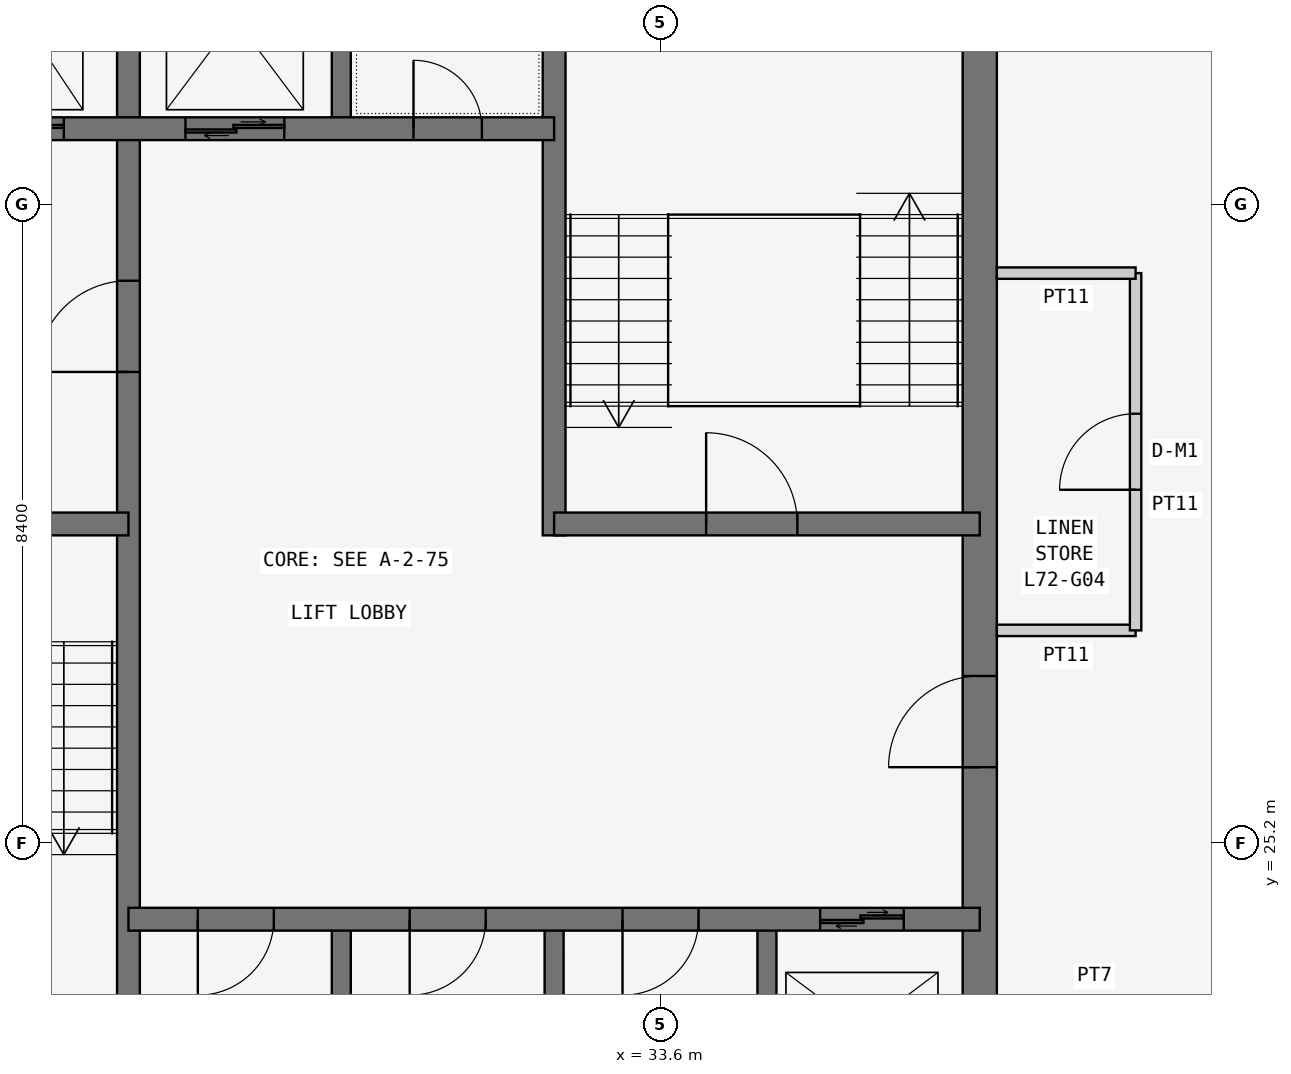
"""IFC4 building model, lengths in metres.
Left out: names, types, materials, properties, quantities, classifications, styles, units other than length and angle.
Written with IfcOpenShell. Run it as: python <this file> out.ifc"""

import sys

from ifc_helpers import new_model, si_unit, direction, frame, frame_2d, origin, place, context, subcontext, project, spatial, rectangle, extrude, element, fill, save


model = new_model("IFC4")
c1 = context("Model", 3, precision=1e-05, world=origin(), true_north=direction((0.0, 1.0)))
c2 = subcontext(c1, "Body", "Model", "MODEL_VIEW")
j1 = project(units=[si_unit("LENGTHUNIT", "METRE"), si_unit("PLANEANGLEUNIT", "RADIAN")], contexts=[c1])
p1 = place(None, origin())
s1 = spatial("IfcSite", under=j1, at=p1, CompositionType="ELEMENT")
p2 = place(p1, origin())
s2 = spatial("IfcBuilding", under=s1, at=p2, CompositionType="ELEMENT")
p3 = place(p2, frame((0.0, 0.0, 275.7)))
s3 = spatial("IfcBuildingStorey", under=s2, at=p3, CompositionType="ELEMENT", Elevation=275.7)
p4 = place(p3, frame((37.8, 21.0, 0.0), z_axis=(0.0, 0.0, 1.0), x_axis=(0.0, 1.0, 0.0)))
e1 = element("IfcWall", 1, at=p4, inside=s3, PredefinedType="SHEAR", context=c2, shape_type="SweptSolid", body=[
    extrude(rectangle(XDim=17.025, YDim=0.45, at=frame_2d((8.512, 0.0))), origin(), (0.0, 0.0, 1.0), 3.6),
])
p5 = place(p4, frame((5.2, 0.0, 0.0)))
e2 = element("IfcOpeningElement", 2, at=p5, cuts=e1, PredefinedType="OPENING", context=c2, shape_type="SweptSolid", body=[
    extrude(rectangle(XDim=1.2, YDim=2.1, at=frame_2d((0.6, 1.05))), frame((0.0, 0.235, 0.0), z_axis=(0.0, -1.0, 0.0), x_axis=(1.0, 0.0, 0.0)), (0.0, 0.0, 1.0), 0.47),
])
p6 = place(p3, frame((26.6, 21.0, 0.0), z_axis=(0.0, 0.0, 1.0), x_axis=(0.0, 1.0, 0.0)))
e3 = element("IfcWall", 3, at=p6, inside=s3, PredefinedType="SHEAR", context=c2, shape_type="SweptSolid", body=[
    extrude(rectangle(XDim=16.8, YDim=0.3, at=frame_2d((8.4, 0.0))), origin(), (0.0, 0.0, 1.0), 3.6),
])
p7 = place(p6, frame((10.4, 0.0, 0.0)))
e4 = element("IfcOpeningElement", 4, at=p7, cuts=e3, PredefinedType="OPENING", context=c2, shape_type="SweptSolid", body=[
    extrude(rectangle(XDim=1.2, YDim=2.1, at=frame_2d((0.6, 1.05))), frame((0.0, 0.16, 0.0), z_axis=(0.0, -1.0, 0.0), x_axis=(1.0, 0.0, 0.0)), (0.0, 0.0, 1.0), 0.32),
])
p8 = place(p3, frame((21.0, 29.4, 0.0), z_axis=(0.0, 0.0, 1.0), x_axis=(1.0, 0.0, 0.0)))
e5 = element("IfcWall", 5, at=p8, inside=s3, PredefinedType="SHEAR", context=c2, shape_type="SweptSolid", body=[
    extrude(rectangle(XDim=5.6, YDim=0.3, at=frame_2d((2.8, 0.0))), origin(), (0.0, 0.0, 1.0), 3.6),
])
p9 = place(p8, frame((2.3, 0.0, 0.0)))
e6 = element("IfcOpeningElement", 6, at=p9, cuts=e5, PredefinedType="OPENING", context=c2, shape_type="SweptSolid", body=[
    extrude(rectangle(XDim=1.2, YDim=2.1, at=frame_2d((0.6, 1.05))), frame((0.0, 0.16, 0.0), z_axis=(0.0, -1.0, 0.0), x_axis=(1.0, 0.0, 0.0)), (0.0, 0.0, 1.0), 0.32),
])
p10 = place(p3, frame((21.0, 34.6, 0.0), z_axis=(0.0, 0.0, 1.0), x_axis=(1.0, 0.0, 0.0)))
e7 = element("IfcWall", 7, at=p10, inside=s3, PredefinedType="SHEAR", context=c2, shape_type="SweptSolid", body=[
    extrude(rectangle(XDim=11.2, YDim=0.3, at=frame_2d((5.6, 0.0))), origin(), (0.0, 0.0, 1.0), 3.6),
])
p11 = place(p10, frame((9.35, 0.0, 0.0)))
e8 = element("IfcOpeningElement", 8, at=p11, cuts=e7, PredefinedType="OPENING", context=c2, shape_type="SweptSolid", body=[
    extrude(rectangle(XDim=0.9, YDim=2.1, at=frame_2d((0.45, 1.05))), frame((0.0, 0.16, 0.0), z_axis=(0.0, -1.0, 0.0), x_axis=(1.0, 0.0, 0.0)), (0.0, 0.0, 1.0), 0.32),
])
p12 = place(p10, frame((1.0, 0.0, 0.0)))
e9 = element("IfcOpeningElement", 9, at=p12, cuts=e7, PredefinedType="OPENING", context=c2, shape_type="SweptSolid", body=[
    extrude(rectangle(XDim=1.1, YDim=2.1, at=frame_2d((0.55, 1.05))), frame((0.0, 0.16, 0.0), z_axis=(0.0, -1.0, 0.0), x_axis=(1.0, 0.0, 0.0)), (0.0, 0.0, 1.0), 0.32),
])
p13 = place(p10, frame((3.65, 0.0, 0.0)))
e10 = element("IfcOpeningElement", 10, at=p13, cuts=e7, PredefinedType="OPENING", context=c2, shape_type="SweptSolid", body=[
    extrude(rectangle(XDim=1.1, YDim=2.1, at=frame_2d((0.55, 1.05))), frame((0.0, 0.16, 0.0), z_axis=(0.0, -1.0, 0.0), x_axis=(1.0, 0.0, 0.0)), (0.0, 0.0, 1.0), 0.32),
])
p14 = place(p10, frame((6.35, 0.0, 0.0)))
e11 = element("IfcOpeningElement", 11, at=p14, cuts=e7, PredefinedType="OPENING", context=c2, shape_type="SweptSolid", body=[
    extrude(rectangle(XDim=1.3, YDim=2.1, at=frame_2d((0.65, 1.05))), frame((0.0, 0.16, 0.0), z_axis=(0.0, -1.0, 0.0), x_axis=(1.0, 0.0, 0.0)), (0.0, 0.0, 1.0), 0.32),
])
p15 = place(p3, frame((26.6, 24.2, 0.0), z_axis=(0.0, 0.0, 1.0), x_axis=(1.0, 0.0, 0.0)))
e12 = element("IfcWall", 12, at=p15, inside=s3, PredefinedType="SHEAR", context=c2, shape_type="SweptSolid", body=[
    extrude(rectangle(XDim=11.2, YDim=0.3, at=frame_2d((5.6, 0.0))), origin(), (0.0, 0.0, 1.0), 3.6),
])
p16 = place(p15, frame((0.913, 0.0, 0.0)))
e13 = element("IfcOpeningElement", 13, at=p16, cuts=e12, PredefinedType="OPENING", context=c2, shape_type="SweptSolid", body=[
    extrude(rectangle(XDim=1.0, YDim=2.1, at=frame_2d((0.5, 1.05))), frame((0.0, 0.16, 0.0), z_axis=(0.0, -1.0, 0.0), x_axis=(1.0, 0.0, 0.0)), (0.0, 0.0, 1.0), 0.32),
])
p17 = place(p15, frame((3.7, 0.0, 0.0)))
e14 = element("IfcOpeningElement", 14, at=p17, cuts=e12, PredefinedType="OPENING", context=c2, shape_type="SweptSolid", body=[
    extrude(rectangle(XDim=1.0, YDim=2.1, at=frame_2d((0.5, 1.05))), frame((0.0, 0.16, 0.0), z_axis=(0.0, -1.0, 0.0), x_axis=(1.0, 0.0, 0.0)), (0.0, 0.0, 1.0), 0.32),
])
p18 = place(p15, frame((6.5, 0.0, 0.0)))
e15 = element("IfcOpeningElement", 15, at=p18, cuts=e12, PredefinedType="OPENING", context=c2, shape_type="SweptSolid", body=[
    extrude(rectangle(XDim=1.0, YDim=2.1, at=frame_2d((0.5, 1.05))), frame((0.0, 0.16, 0.0), z_axis=(0.0, -1.0, 0.0), x_axis=(1.0, 0.0, 0.0)), (0.0, 0.0, 1.0), 0.32),
])
p19 = place(p15, frame((9.1, 0.0, 0.0)))
e16 = element("IfcOpeningElement", 16, at=p19, cuts=e12, PredefinedType="OPENING", context=c2, shape_type="SweptSolid", body=[
    extrude(rectangle(XDim=1.1, YDim=2.1, at=frame_2d((0.55, 1.05))), frame((0.0, 0.16, 0.0), z_axis=(0.0, -1.0, 0.0), x_axis=(1.0, 0.0, 0.0)), (0.0, 0.0, 1.0), 0.32),
])
p20 = place(p3, frame((32.2, 29.25, 0.0), z_axis=(0.0, 0.0, 1.0), x_axis=(0.0, 1.0, 0.0)))
e17 = element("IfcWall", 17, at=p20, inside=s3, PredefinedType="SHEAR", context=c2, shape_type="SweptSolid", body=[
    extrude(rectangle(XDim=8.55, YDim=0.3, at=frame_2d((4.275, 0.0))), origin(), (0.0, 0.0, 1.0), 3.6),
])
p21 = place(p3, frame((32.2, 29.4, 0.0), z_axis=(0.0, 0.0, 1.0), x_axis=(1.0, 0.0, 0.0)))
e18 = element("IfcWall", 18, at=p21, inside=s3, PredefinedType="SHEAR", context=c2, shape_type="SweptSolid", body=[
    extrude(rectangle(XDim=5.6, YDim=0.3, at=frame_2d((2.8, 0.0))), origin(), (0.0, 0.0, 1.0), 3.6),
])
p22 = place(p21, frame((2.0, 0.0, 0.0)))
e19 = element("IfcOpeningElement", 19, at=p22, cuts=e18, PredefinedType="OPENING", context=c2, shape_type="SweptSolid", body=[
    extrude(rectangle(XDim=1.2, YDim=2.1, at=frame_2d((0.6, 1.05))), frame((0.0, 0.16, 0.0), z_axis=(0.0, -1.0, 0.0), x_axis=(1.0, 0.0, 0.0)), (0.0, 0.0, 1.0), 0.32),
])
for number, where, z_axis, x_axis in (
    (20, (29.4, 21.0, 0.0), (0.0, 0.0, 1.0), (0.0, 1.0, 0.0)),
    (21, (32.2, 21.0, 0.0), (0.0, 0.0, 1.0), (0.0, 1.0, 0.0)),
    (22, (35.0, 21.0, 0.0), (0.0, 0.0, 1.0), (0.0, 1.0, 0.0)),
    (23, (29.4, 34.6, 0.0), (0.0, 0.0, 1.0), (0.0, 1.0, 0.0)),
):
    element("IfcWall", number, at=place(p3, frame(where, z_axis=z_axis, x_axis=x_axis)), inside=s3, PredefinedType="SHEAR", context=c2, shape_type="SweptSolid", body=[
        extrude(rectangle(XDim=3.2, YDim=0.25, at=frame_2d((1.6, 0.0))), origin(), (0.0, 0.0, 1.0), 3.6),
    ])
p23 = place(p3, frame((40.6, 23.1, 0.0), z_axis=(0.0, 0.0, 1.0), x_axis=(-1.0, 0.0, 0.0)))
e24 = element("IfcWall", 24, at=p23, inside=s3, PredefinedType="PARTITIONING", context=c2, shape_type="SweptSolid", body=[
    extrude(rectangle(XDim=2.575, YDim=0.2, at=frame_2d((1.288, 0.0))), origin(), (0.0, 0.0, 1.0), 3.45),
])
p24 = place(p3, frame((38.025, 28.0, 0.0), z_axis=(0.0, 0.0, 1.0), x_axis=(1.0, 0.0, 0.0)))
e25 = element("IfcWall", 25, at=p24, inside=s3, PredefinedType="PARTITIONING", context=c2, shape_type="SweptSolid", body=[
    extrude(rectangle(XDim=1.825, YDim=0.15, at=frame_2d((0.913, 0.0))), origin(), (0.0, 0.0, 1.0), 3.45),
])
p25 = place(p3, frame((39.85, 28.0, 0.0), z_axis=(0.0, 0.0, 1.0), x_axis=(0.0, 1.0, 0.0)))
e26 = element("IfcWall", 26, at=p25, inside=s3, PredefinedType="PARTITIONING", context=c2, shape_type="SweptSolid", body=[
    extrude(rectangle(XDim=4.7, YDim=0.15, at=frame_2d((2.35, 0.0))), origin(), (0.0, 0.0, 1.0), 3.45),
])
p26 = place(p25, frame((1.85, 0.0, 0.0)))
e27 = element("IfcOpeningElement", 27, at=p26, cuts=e26, PredefinedType="OPENING", context=c2, shape_type="SweptSolid", body=[
    extrude(rectangle(XDim=1.0, YDim=2.1, at=frame_2d((0.5, 1.05))), frame((0.0, 0.085, 0.0), z_axis=(0.0, -1.0, 0.0), x_axis=(1.0, 0.0, 0.0)), (0.0, 0.0, 1.0), 0.17),
])
p27 = place(p3, frame((39.85, 32.7, 0.0), z_axis=(0.0, 0.0, 1.0), x_axis=(-1.0, 0.0, 0.0)))
e28 = element("IfcWall", 28, at=p27, inside=s3, PredefinedType="PARTITIONING", context=c2, shape_type="SweptSolid", body=[
    extrude(rectangle(XDim=1.825, YDim=0.15, at=frame_2d((0.913, 0.0))), origin(), (0.0, 0.0, 1.0), 3.45),
])
p28 = place(p26, origin())
e29 = element("IfcDoor", 29, at=p28, inside=s3, OperationType="SINGLE_SWING_LEFT", PredefinedType="DOOR", context=c2, shape_type="SweptSolid", body=[
    extrude(rectangle(XDim=1.0, YDim=2.1, at=frame_2d((0.5, 1.05))), frame((0.0, 0.025, 0.0), z_axis=(0.0, -1.0, 0.0), x_axis=(1.0, 0.0, 0.0)), (0.0, 0.0, 1.0), 0.05),
])
fill(e27, e29)
p29 = place(p7, origin())
e30 = element("IfcDoor", 30, at=p29, inside=s3, OperationType="SINGLE_SWING_LEFT", PredefinedType="DOOR", context=c2, shape_type="SweptSolid", body=[
    extrude(rectangle(XDim=1.2, YDim=2.1, at=frame_2d((0.6, 1.05))), frame((0.0, 0.025, 0.0), z_axis=(0.0, -1.0, 0.0), x_axis=(1.0, 0.0, 0.0)), (0.0, 0.0, 1.0), 0.05),
])
fill(e4, e30)
p30 = place(p5, origin())
e31 = element("IfcDoor", 31, at=p30, inside=s3, OperationType="SINGLE_SWING_LEFT", PredefinedType="DOOR", context=c2, shape_type="SweptSolid", body=[
    extrude(rectangle(XDim=1.2, YDim=2.1, at=frame_2d((0.6, 1.05))), frame((0.0, 0.025, 0.0), z_axis=(0.0, -1.0, 0.0), x_axis=(1.0, 0.0, 0.0)), (0.0, 0.0, 1.0), 0.05),
])
fill(e2, e31)
p31 = place(p22, origin())
e32 = element("IfcDoor", 32, at=p31, inside=s3, OperationType="SINGLE_SWING_LEFT", PredefinedType="DOOR", context=c2, shape_type="SweptSolid", body=[
    extrude(rectangle(XDim=1.2, YDim=2.1, at=frame_2d((0.6, 1.05))), frame((0.0, 0.025, 0.0), z_axis=(0.0, -1.0, 0.0), x_axis=(1.0, 0.0, 0.0)), (0.0, 0.0, 1.0), 0.05),
])
fill(e19, e32)
p32 = place(p11, origin())
e33 = element("IfcDoor", 33, at=p32, inside=s3, OperationType="SINGLE_SWING_LEFT", PredefinedType="DOOR", context=c2, shape_type="SweptSolid", body=[
    extrude(rectangle(XDim=0.9, YDim=2.1, at=frame_2d((0.45, 1.05))), frame((0.0, 0.025, 0.0), z_axis=(0.0, -1.0, 0.0), x_axis=(1.0, 0.0, 0.0)), (0.0, 0.0, 1.0), 0.05),
])
fill(e8, e33)
p33 = place(p16, frame((1.0, 0.0, 0.0), z_axis=(0.0, 0.0, 1.0), x_axis=(-1.0, 0.0, 0.0)))
e34 = element("IfcDoor", 34, at=p33, inside=s3, OperationType="SINGLE_SWING_RIGHT", PredefinedType="DOOR", context=c2, shape_type="SweptSolid", body=[
    extrude(rectangle(XDim=1.0, YDim=2.1, at=frame_2d((0.5, 1.05))), frame((0.0, 0.025, 0.0), z_axis=(0.0, -1.0, 0.0), x_axis=(1.0, 0.0, 0.0)), (0.0, 0.0, 1.0), 0.05),
])
fill(e13, e34)
p34 = place(p17, frame((1.0, 0.0, 0.0), z_axis=(0.0, 0.0, 1.0), x_axis=(-1.0, 0.0, 0.0)))
e35 = element("IfcDoor", 35, at=p34, inside=s3, OperationType="SINGLE_SWING_RIGHT", PredefinedType="DOOR", context=c2, shape_type="SweptSolid", body=[
    extrude(rectangle(XDim=1.0, YDim=2.1, at=frame_2d((0.5, 1.05))), frame((0.0, 0.025, 0.0), z_axis=(0.0, -1.0, 0.0), x_axis=(1.0, 0.0, 0.0)), (0.0, 0.0, 1.0), 0.05),
])
fill(e14, e35)
p35 = place(p18, frame((1.0, 0.0, 0.0), z_axis=(0.0, 0.0, 1.0), x_axis=(-1.0, 0.0, 0.0)))
e36 = element("IfcDoor", 36, at=p35, inside=s3, OperationType="SINGLE_SWING_RIGHT", PredefinedType="DOOR", context=c2, shape_type="SweptSolid", body=[
    extrude(rectangle(XDim=1.0, YDim=2.1, at=frame_2d((0.5, 1.05))), frame((0.0, 0.025, 0.0), z_axis=(0.0, -1.0, 0.0), x_axis=(1.0, 0.0, 0.0)), (0.0, 0.0, 1.0), 0.05),
])
fill(e15, e36)
p36 = place(p19, origin())
e37 = element("IfcDoor", 37, at=p36, inside=s3, OperationType="DOUBLE_DOOR_SLIDING", PredefinedType="DOOR", context=c2, shape_type="SweptSolid", body=[
    extrude(rectangle(XDim=1.1, YDim=2.1, at=frame_2d((0.55, 1.05))), frame((0.0, 0.025, 0.0), z_axis=(0.0, -1.0, 0.0), x_axis=(1.0, 0.0, 0.0)), (0.0, 0.0, 1.0), 0.05),
])
fill(e16, e37)
p37 = place(p13, origin())
e38 = element("IfcDoor", 38, at=p37, inside=s3, OperationType="DOUBLE_DOOR_SLIDING", PredefinedType="DOOR", context=c2, shape_type="SweptSolid", body=[
    extrude(rectangle(XDim=1.1, YDim=2.1, at=frame_2d((0.55, 1.05))), frame((0.0, 0.025, 0.0), z_axis=(0.0, -1.0, 0.0), x_axis=(1.0, 0.0, 0.0)), (0.0, 0.0, 1.0), 0.05),
])
fill(e10, e38)
p38 = place(p14, origin())
e39 = element("IfcDoor", 39, at=p38, inside=s3, OperationType="DOUBLE_DOOR_SLIDING", PredefinedType="DOOR", context=c2, shape_type="SweptSolid", body=[
    extrude(rectangle(XDim=1.3, YDim=2.1, at=frame_2d((0.65, 1.05))), frame((0.0, 0.025, 0.0), z_axis=(0.0, -1.0, 0.0), x_axis=(1.0, 0.0, 0.0)), (0.0, 0.0, 1.0), 0.05),
])
fill(e11, e39)
save(model, sys.argv[1])
